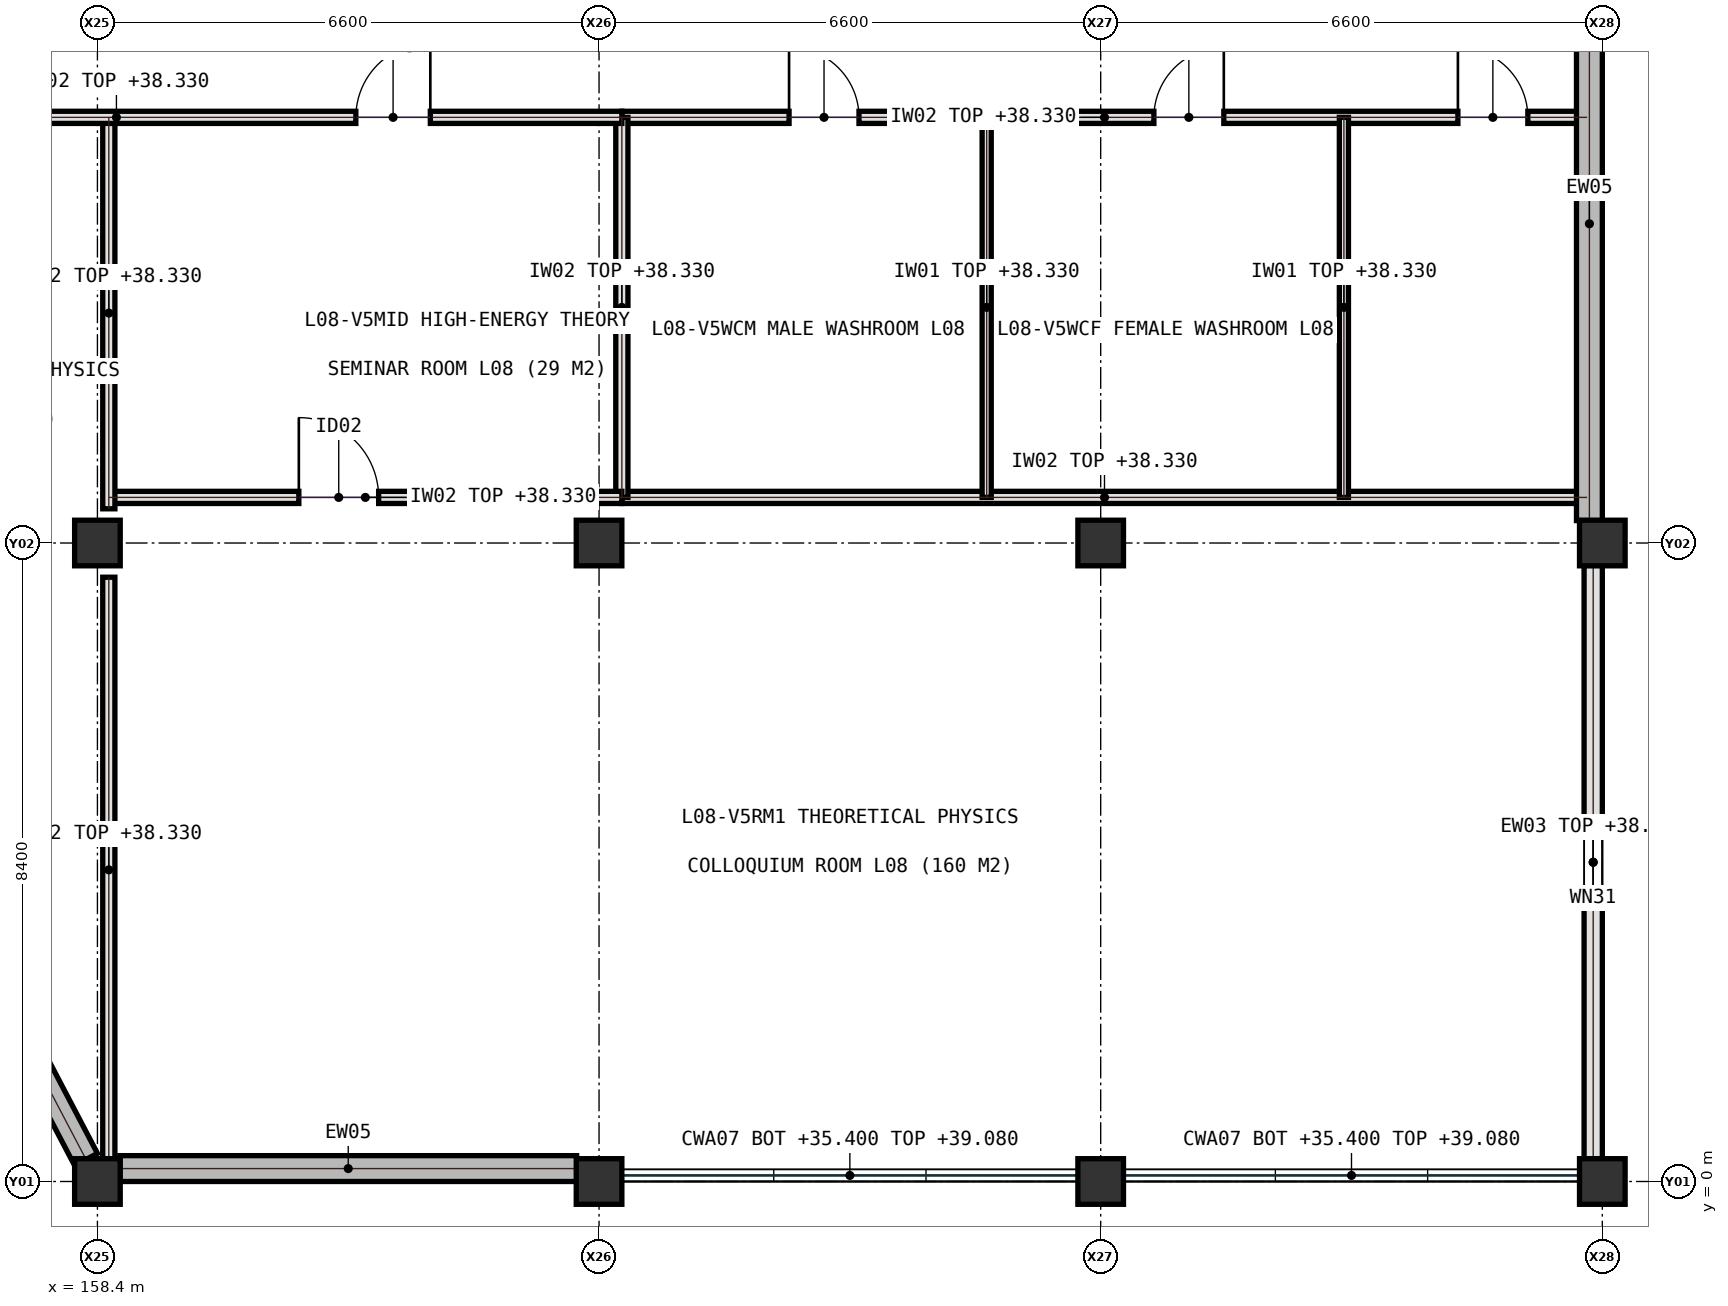
"""IFC4 building model, lengths in metres.
Left out: names, types, materials, properties, quantities, classifications, styles, units other than length and angle.
Written with IfcOpenShell. Run it as: python <this file> out.ifc"""

import sys

from ifc_helpers import new_model, si_unit, direction, frame, frame_2d, origin, origin_2d, place, context, subcontext, project, spatial, rectangle, extrude, element, fill, save


model = new_model("IFC4")
c1 = context("Model", 3, precision=1e-05, world=origin(), true_north=direction((0.0, 1.0)))
c2 = subcontext(c1, "Body", "Model", "MODEL_VIEW")
j1 = project(units=[si_unit("LENGTHUNIT", "METRE"), si_unit("PLANEANGLEUNIT", "RADIAN")], contexts=[c1])
p1 = place(None, origin())
s1 = spatial("IfcSite", under=j1, at=p1, CompositionType="ELEMENT")
p2 = place(p1, origin())
s2 = spatial("IfcBuilding", under=s1, at=p2, CompositionType="ELEMENT")
p3 = place(p2, frame((0.0, 0.0, 35.4)))
s3 = spatial("IfcBuildingStorey", under=s2, at=p3, CompositionType="ELEMENT", Elevation=35.4)
for number, where, z_axis, x_axis in (
    (1, (158.4, 0.0, 0.0), (0.0, 0.0, 1.0), (1.0, 0.0, 0.0)),
    (2, (158.4, 8.4, 0.0), (0.0, 0.0, 1.0), (1.0, 0.0, 0.0)),
    (3, (165.0, 0.0, 0.0), (0.0, 0.0, 1.0), (1.0, 0.0, 0.0)),
    (4, (165.0, 8.4, 0.0), (0.0, 0.0, 1.0), (1.0, 0.0, 0.0)),
    (5, (171.6, 0.0, 0.0), (0.0, 0.0, 1.0), (1.0, 0.0, 0.0)),
    (6, (171.6, 8.4, 0.0), (0.0, 0.0, 1.0), (1.0, 0.0, 0.0)),
    (7, (178.2, 0.0, 0.0), (0.0, 0.0, 1.0), (1.0, 0.0, 0.0)),
    (8, (178.2, 8.4, 0.0), (0.0, 0.0, 1.0), (1.0, 0.0, 0.0)),
):
    element("IfcColumn", number, at=place(p3, frame(where, z_axis=z_axis, x_axis=x_axis)), inside=s3, PredefinedType="COLUMN", context=c2, shape_type="SweptSolid", body=[
        extrude(rectangle(XDim=0.6, YDim=0.6, at=origin_2d()), origin(), (0.0, 0.0, 1.0), 3.9),
    ])
p4 = place(p3, frame((165.3, 14.0, 0.0), z_axis=(0.0, 0.0, 1.0), x_axis=(1.0, 0.0, 0.0)))
e9 = element("IfcWall", 9, at=p4, inside=s3, PredefinedType="PARTITIONING", context=c2, shape_type="SweptSolid", body=[
    extrude(rectangle(XDim=12.7, YDim=0.16, at=frame_2d((6.35, 0.0))), origin(), (0.0, 0.0, 1.0), 2.93),
])
p5 = place(p4, frame((2.2, 0.0, 0.0)))
e10 = element("IfcOpeningElement", 10, at=p5, cuts=e9, PredefinedType="OPENING", context=c2, shape_type="SweptSolid", body=[
    extrude(rectangle(XDim=0.92, YDim=2.08, at=frame_2d((0.46, 1.04))), frame((0.0, 0.09, 0.0), z_axis=(0.0, -1.0, 0.0), x_axis=(1.0, 0.0, 0.0)), (0.0, 0.0, 1.0), 0.18),
])
p6 = place(p4, frame((7.0, 0.0, 0.0)))
e11 = element("IfcOpeningElement", 11, at=p6, cuts=e9, PredefinedType="OPENING", context=c2, shape_type="SweptSolid", body=[
    extrude(rectangle(XDim=0.92, YDim=2.08, at=frame_2d((0.46, 1.04))), frame((0.0, 0.09, 0.0), z_axis=(0.0, -1.0, 0.0), x_axis=(1.0, 0.0, 0.0)), (0.0, 0.0, 1.0), 0.18),
])
p7 = place(p4, frame((11.0, 0.0, 0.0)))
e12 = element("IfcOpeningElement", 12, at=p7, cuts=e9, PredefinedType="OPENING", context=c2, shape_type="SweptSolid", body=[
    extrude(rectangle(XDim=0.92, YDim=2.08, at=frame_2d((0.46, 1.04))), frame((0.0, 0.09, 0.0), z_axis=(0.0, -1.0, 0.0), x_axis=(1.0, 0.0, 0.0)), (0.0, 0.0, 1.0), 0.18),
])
p8 = place(p3, frame((165.3, 9.0, 0.0), z_axis=(0.0, 0.0, 1.0), x_axis=(1.0, 0.0, 0.0)))
e13 = element("IfcWall", 13, at=p8, inside=s3, PredefinedType="PARTITIONING", context=c2, shape_type="SweptSolid", body=[
    extrude(rectangle(XDim=12.7, YDim=0.16, at=frame_2d((6.35, 0.0))), origin(), (0.0, 0.0, 1.0), 2.93),
])
p9 = place(p3, frame((165.3, 9.0, 0.0), z_axis=(0.0, 0.0, 1.0), x_axis=(0.0, 1.0, 0.0)))
e14 = element("IfcWall", 14, at=p9, inside=s3, PredefinedType="PARTITIONING", context=c2, shape_type="SweptSolid", body=[
    extrude(rectangle(XDim=5.0, YDim=0.16, at=frame_2d((2.5, 0.0))), origin(), (0.0, 0.0, 1.0), 2.93),
])
for number, where, z_axis, x_axis in (
    (15, (170.1, 9.0, 0.0), (0.0, 0.0, 1.0), (0.0, 1.0, 0.0)),
    (16, (174.8, 9.0, 0.0), (0.0, 0.0, 1.0), (0.0, 1.0, 0.0)),
):
    element("IfcWall", number, at=place(p3, frame(where, z_axis=z_axis, x_axis=x_axis)), inside=s3, PredefinedType="PARTITIONING", context=c2, shape_type="SweptSolid", body=[
        extrude(rectangle(XDim=5.0, YDim=0.12, at=frame_2d((2.5, 0.0))), origin(), (0.0, 0.0, 1.0), 2.93),
    ])
p10 = place(p3, frame((158.55, 9.0, 0.0), z_axis=(0.0, 0.0, 1.0), x_axis=(1.0, 0.0, 0.0)))
e17 = element("IfcWall", 17, at=p10, inside=s3, PredefinedType="PARTITIONING", context=c2, shape_type="SweptSolid", body=[
    extrude(rectangle(XDim=6.75, YDim=0.16, at=frame_2d((3.375, 0.0))), origin(), (0.0, 0.0, 1.0), 2.93),
])
p11 = place(p10, frame((2.5, 0.0, 0.0)))
e18 = element("IfcOpeningElement", 18, at=p11, cuts=e17, PredefinedType="OPENING", context=c2, shape_type="SweptSolid", body=[
    extrude(rectangle(XDim=1.05, YDim=2.15, at=frame_2d((0.525, 1.075))), frame((0.0, 0.09, 0.0), z_axis=(0.0, -1.0, 0.0), x_axis=(1.0, 0.0, 0.0)), (0.0, 0.0, 1.0), 0.18),
])
p12 = place(p3, frame((158.55, 0.25, 0.0), z_axis=(0.0, 0.0, 1.0), x_axis=(0.0, 1.0, 0.0)))
e19 = element("IfcWall", 19, at=p12, inside=s3, PredefinedType="PARTITIONING", context=c2, shape_type="SweptSolid", body=[
    extrude(rectangle(XDim=7.7, YDim=0.16, at=frame_2d((3.85, 0.0))), origin(), (0.0, 0.0, 1.0), 2.93),
])
p13 = place(p3, frame((158.55, 8.85, 0.0), z_axis=(0.0, 0.0, 1.0), x_axis=(0.0, 1.0, 0.0)))
e20 = element("IfcWall", 20, at=p13, inside=s3, PredefinedType="PARTITIONING", context=c2, shape_type="SweptSolid", body=[
    extrude(rectangle(XDim=5.15, YDim=0.16, at=frame_2d((2.575, 0.0))), origin(), (0.0, 0.0, 1.0), 2.93),
])
p14 = place(p3, frame((152.0, 14.0, 0.0), z_axis=(0.0, 0.0, 1.0), x_axis=(1.0, 0.0, 0.0)))
e21 = element("IfcWall", 21, at=p14, inside=s3, PredefinedType="PARTITIONING", context=c2, shape_type="SweptSolid", body=[
    extrude(rectangle(XDim=13.3, YDim=0.16, at=frame_2d((6.65, 0.0))), origin(), (0.0, 0.0, 1.0), 2.93),
])
p15 = place(p14, frame((2.6, 0.0, 0.0)))
e22 = element("IfcOpeningElement", 22, at=p15, cuts=e21, PredefinedType="OPENING", context=c2, shape_type="SweptSolid", body=[
    extrude(rectangle(XDim=0.98, YDim=2.12, at=frame_2d((0.49, 1.06))), frame((0.0, 0.09, 0.0), z_axis=(0.0, -1.0, 0.0), x_axis=(1.0, 0.0, 0.0)), (0.0, 0.0, 1.0), 0.18),
])
p16 = place(p14, frame((9.8, 0.0, 0.0)))
e23 = element("IfcOpeningElement", 23, at=p16, cuts=e21, PredefinedType="OPENING", context=c2, shape_type="SweptSolid", body=[
    extrude(rectangle(XDim=0.98, YDim=2.12, at=frame_2d((0.49, 1.06))), frame((0.0, 0.09, 0.0), z_axis=(0.0, -1.0, 0.0), x_axis=(1.0, 0.0, 0.0)), (0.0, 0.0, 1.0), 0.18),
])
p17 = place(p3, frame((158.695, 0.17, 0.0), z_axis=(0.0, 0.0, 1.0), x_axis=(1.0, 0.0, 0.0)))
e24 = element("IfcWall", 24, at=p17, inside=s3, PredefinedType="SHEAR", context=c2, shape_type="SweptSolid", body=[
    extrude(rectangle(XDim=6.01, YDim=0.34, at=frame_2d((3.005, 0.0))), origin(), (0.0, 0.0, 1.0), 3.68),
])
p18 = place(p3, frame((178.08, 0.295, 0.0), z_axis=(0.0, 0.0, 1.0), x_axis=(0.0, 1.0, 0.0)))
e25 = element("IfcWall", 25, at=p18, inside=s3, PredefinedType="SOLIDWALL", context=c2, shape_type="SweptSolid", body=[
    extrude(rectangle(XDim=7.81, YDim=0.24, at=frame_2d((3.905, 0.0))), origin(), (0.0, 0.0, 1.0), 3.065),
])
p19 = place(p18, frame((3.33, 0.0, 0.95)))
e26 = element("IfcOpeningElement", 26, at=p19, cuts=e25, PredefinedType="OPENING", context=c2, shape_type="SweptSolid", body=[
    extrude(rectangle(XDim=1.15, YDim=1.6, at=frame_2d((0.575, 0.8))), frame((0.0, 0.13, 0.0), z_axis=(0.0, -1.0, 0.0), x_axis=(1.0, 0.0, 0.0)), (0.0, 0.0, 1.0), 0.26),
])
p20 = place(p3, frame((178.03, 8.695, 0.0), z_axis=(0.0, 0.0, 1.0), x_axis=(0.0, 1.0, 0.0)))
e27 = element("IfcWall", 27, at=p20, inside=s3, PredefinedType="SHEAR", context=c2, shape_type="SweptSolid", body=[
    extrude(rectangle(XDim=7.81, YDim=0.34, at=frame_2d((3.905, 0.0))), origin(), (0.0, 0.0, 1.0), 3.68),
])
p21 = place(p3, frame((155.25, 6.01, 0.0), z_axis=(0.0, 0.0, 1.0), x_axis=(0.464471613901, -0.885588007981, 0.0)))
e28 = element("IfcWall", 28, at=p21, inside=s3, PredefinedType="SHEAR", context=c2, shape_type="SweptSolid", body=[
    extrude(rectangle(XDim=6.459, YDim=0.34, at=frame_2d((3.229, 0.0))), origin(), (0.0, 0.0, 1.0), 3.68),
])
p22 = place(p5, origin())
e29 = element("IfcDoor", 29, at=p22, inside=s3, OperationType="SINGLE_SWING_LEFT", PredefinedType="DOOR", context=c2, shape_type="SweptSolid", body=[
    extrude(rectangle(XDim=0.92, YDim=2.08, at=frame_2d((0.46, 1.04))), frame((0.0, 0.025, 0.0), z_axis=(0.0, -1.0, 0.0), x_axis=(1.0, 0.0, 0.0)), (0.0, 0.0, 1.0), 0.05),
])
fill(e10, e29)
p23 = place(p6, origin())
e30 = element("IfcDoor", 30, at=p23, inside=s3, OperationType="SINGLE_SWING_RIGHT", PredefinedType="DOOR", context=c2, shape_type="SweptSolid", body=[
    extrude(rectangle(XDim=0.92, YDim=2.08, at=frame_2d((0.46, 1.04))), frame((0.0, 0.025, 0.0), z_axis=(0.0, -1.0, 0.0), x_axis=(1.0, 0.0, 0.0)), (0.0, 0.0, 1.0), 0.05),
])
fill(e11, e30)
p24 = place(p7, origin())
e31 = element("IfcDoor", 31, at=p24, inside=s3, OperationType="SINGLE_SWING_LEFT", PredefinedType="DOOR", context=c2, shape_type="SweptSolid", body=[
    extrude(rectangle(XDim=0.92, YDim=2.08, at=frame_2d((0.46, 1.04))), frame((0.0, 0.025, 0.0), z_axis=(0.0, -1.0, 0.0), x_axis=(1.0, 0.0, 0.0)), (0.0, 0.0, 1.0), 0.05),
])
fill(e12, e31)
p25 = place(p11, origin())
e32 = element("IfcDoor", 32, at=p25, inside=s3, OperationType="SINGLE_SWING_LEFT", PredefinedType="DOOR", context=c2, shape_type="SweptSolid", body=[
    extrude(rectangle(XDim=1.05, YDim=2.15, at=frame_2d((0.525, 1.075))), frame((0.0, 0.025, 0.0), z_axis=(0.0, -1.0, 0.0), x_axis=(1.0, 0.0, 0.0)), (0.0, 0.0, 1.0), 0.05),
])
fill(e18, e32)
p26 = place(p16, origin())
e33 = element("IfcDoor", 33, at=p26, inside=s3, OperationType="SINGLE_SWING_RIGHT", PredefinedType="DOOR", context=c2, shape_type="SweptSolid", body=[
    extrude(rectangle(XDim=0.98, YDim=2.12, at=frame_2d((0.49, 1.06))), frame((0.0, 0.025, 0.0), z_axis=(0.0, -1.0, 0.0), x_axis=(1.0, 0.0, 0.0)), (0.0, 0.0, 1.0), 0.05),
])
fill(e23, e33)
p27 = place(p19, origin())
e34 = element("IfcWindow", 34, at=p27, inside=s3, PartitioningType="SINGLE_PANEL", PredefinedType="WINDOW", context=c2, shape_type="SweptSolid", body=[
    extrude(rectangle(XDim=1.15, YDim=1.6, at=frame_2d((0.575, 0.8))), frame((0.0, 0.03, 0.0), z_axis=(0.0, -1.0, 0.0), x_axis=(1.0, 0.0, 0.0)), (0.0, 0.0, 1.0), 0.06),
])
fill(e26, e34)
save(model, sys.argv[1])
